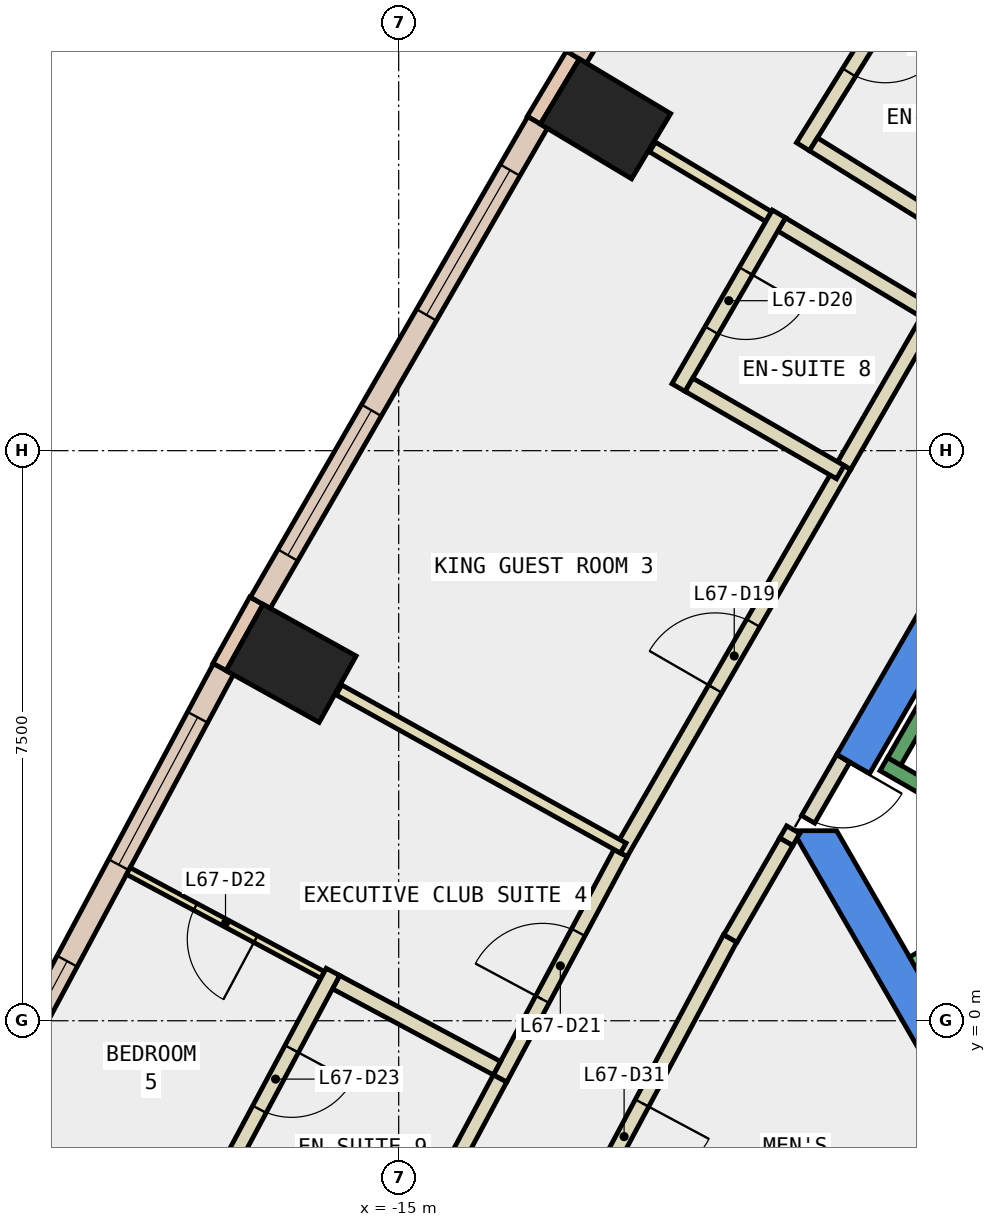
"""IFC4 building model, lengths in metres.
Left out: names, types, materials, properties, quantities, classifications, styles, units other than length and angle.
Written with IfcOpenShell. Run it as: python <this file> out.ifc"""

import sys

from ifc_helpers import new_model, si_unit, direction, frame, frame_2d, origin, origin_2d, place, context, subcontext, project, spatial, polyline, rectangle, outline, extrude, element, fill, save


model = new_model("IFC4")
c1 = context("Model", 3, precision=1e-05, world=origin(), true_north=direction((0.0, 1.0)))
c2 = subcontext(c1, "Body", "Model", "MODEL_VIEW")
j1 = project(units=[si_unit("LENGTHUNIT", "METRE"), si_unit("PLANEANGLEUNIT", "RADIAN")], contexts=[c1])
p1 = place(None, origin())
s1 = spatial("IfcSite", under=j1, at=p1, CompositionType="ELEMENT")
p2 = place(p1, origin())
s2 = spatial("IfcBuilding", under=s1, at=p2, CompositionType="ELEMENT")
p3 = place(p2, frame((0.0, 0.0, 290.0)))
s3 = spatial("IfcBuildingStorey", under=s2, at=p3, CompositionType="ELEMENT", Elevation=290.0)
for number, where, z_axis, x_axis in (
    (1, (-12.279, 11.865, -0.34), (0.0, 0.0, 1.0), (0.514, 0.858, 0.0)),
    (2, (-16.415, 4.702, -0.34), (0.0, 0.0, 1.0), (0.486, 0.874, 0.0)),
):
    element("IfcColumn", number, at=place(p3, frame(where, z_axis=z_axis, x_axis=x_axis)), inside=s3, PredefinedType="COLUMN", context=c2, shape_type="SweptSolid", body=[
        extrude(rectangle(XDim=1.0, YDim=1.4, at=origin_2d()), origin(), (0.0, 0.0, 1.0), 3.6),
    ])
p4 = place(p3, frame((0.0, 0.0, -0.34)))
e3 = element("IfcWall", 3, at=p4, inside=s3, PredefinedType="SHEAR", context=c2, shape_type="SweptSolid", body=[
    extrude(outline(polyline([(-9.236, 3.502), (-8.803, 3.253), (-4.619, 10.5), (-4.907, 11.0), (-9.236, 3.502)])), origin(), (0.0, 0.0, 1.0), 3.6),
])
p5 = place(p3, frame((0.0, 0.0, -0.34)))
e4 = element("IfcWall", 4, at=p5, inside=s3, PredefinedType="SHEAR", context=c2, shape_type="SweptSolid", body=[
    extrude(outline(polyline([(-9.815, 2.5), (-4.907, -6.0), (-4.619, -5.5), (-9.238, 2.5), (-9.815, 2.5)])), origin(), (0.0, 0.0, 1.0), 3.6),
])
p6 = place(p3, frame((-12.708, 12.706, 0.0), z_axis=(0.0, 0.0, 1.0), x_axis=(-0.513777707721, -0.857923345672, 0.0)))
e5 = element("IfcWall", 5, at=p6, inside=s3, PredefinedType="STANDARD", context=c2, shape_type="SweptSolid", body=[
    extrude(rectangle(XDim=1.0, YDim=0.2, at=frame_2d((0.5, 0.0))), origin(), (0.0, 0.0, 1.0), 3.26),
])
p7 = place(p3, frame((-16.872, 5.527, 0.0), z_axis=(0.0, 0.0, 1.0), x_axis=(-0.485850211157, -0.874042088414, 0.0)))
e6 = element("IfcWall", 6, at=p7, inside=s3, PredefinedType="STANDARD", context=c2, shape_type="SweptSolid", body=[
    extrude(rectangle(XDim=1.0, YDim=0.2, at=frame_2d((0.5, 0.0))), origin(), (0.0, 0.0, 1.0), 3.26),
])
p8 = place(p3, frame((-8.819, 18.855, 0.0), z_axis=(0.0, 0.0, 1.0), x_axis=(-0.527762071678, -0.849392250788, 0.0)))
e7 = element("IfcWall", 7, at=p8, inside=s3, PredefinedType="STANDARD", context=c2, shape_type="SweptSolid", body=[
    extrude(rectangle(XDim=7.276, YDim=0.3, at=frame_2d((3.638, 0.0))), origin(), (0.0, 0.0, 1.0), 3.26),
])
p9 = place(p8, frame((0.719, 0.0, 0.9)))
e8 = element("IfcOpeningElement", 8, at=p9, cuts=e7, PredefinedType="OPENING", context=c2, shape_type="SweptSolid", body=[
    extrude(rectangle(XDim=2.2, YDim=2.0, at=frame_2d((1.1, 1.0))), frame((0.0, 0.16, 0.0), z_axis=(0.0, -1.0, 0.0), x_axis=(1.0, 0.0, 0.0)), (0.0, 0.0, 1.0), 0.32),
])
p10 = place(p8, frame((4.357, 0.0, 0.9)))
e9 = element("IfcOpeningElement", 9, at=p10, cuts=e7, PredefinedType="OPENING", context=c2, shape_type="SweptSolid", body=[
    extrude(rectangle(XDim=2.2, YDim=2.0, at=frame_2d((1.1, 1.0))), frame((0.0, 0.16, 0.0), z_axis=(0.0, -1.0, 0.0), x_axis=(1.0, 0.0, 0.0)), (0.0, 0.0, 1.0), 0.32),
])
p11 = place(p3, frame((-13.172, 11.819, 0.0), z_axis=(0.0, 0.0, 1.0), x_axis=(-0.499945412946, -0.866056917341, 0.0)))
e10 = element("IfcWall", 10, at=p11, inside=s3, PredefinedType="STANDARD", context=c2, shape_type="SweptSolid", body=[
    extrude(rectangle(XDim=7.299, YDim=0.3, at=frame_2d((3.649, 0.0))), origin(), (0.0, 0.0, 1.0), 3.26),
])
p12 = place(p11, frame((0.725, 0.0, 0.9)))
e11 = element("IfcOpeningElement", 11, at=p12, cuts=e10, PredefinedType="OPENING", context=c2, shape_type="SweptSolid", body=[
    extrude(rectangle(XDim=2.2, YDim=2.0, at=frame_2d((1.1, 1.0))), frame((0.0, 0.16, 0.0), z_axis=(0.0, -1.0, 0.0), x_axis=(1.0, 0.0, 0.0)), (0.0, 0.0, 1.0), 0.32),
])
p13 = place(p11, frame((4.374, 0.0, 0.9)))
e12 = element("IfcOpeningElement", 12, at=p13, cuts=e10, PredefinedType="OPENING", context=c2, shape_type="SweptSolid", body=[
    extrude(rectangle(XDim=2.2, YDim=2.0, at=frame_2d((1.1, 1.0))), frame((0.0, 0.16, 0.0), z_axis=(0.0, -1.0, 0.0), x_axis=(1.0, 0.0, 0.0)), (0.0, 0.0, 1.0), 0.32),
])
p14 = place(p3, frame((-17.306, 4.626, 0.0), z_axis=(0.0, 0.0, 1.0), x_axis=(-0.471789353675, -0.881711293882, 0.0)))
e13 = element("IfcWall", 13, at=p14, inside=s3, PredefinedType="STANDARD", context=c2, shape_type="SweptSolid", body=[
    extrude(rectangle(XDim=7.277, YDim=0.3, at=frame_2d((3.638, 0.0))), origin(), (0.0, 0.0, 1.0), 3.26),
])
p15 = place(p14, frame((0.719, 0.0, 0.9)))
e14 = element("IfcOpeningElement", 14, at=p15, cuts=e13, PredefinedType="OPENING", context=c2, shape_type="SweptSolid", body=[
    extrude(rectangle(XDim=2.2, YDim=2.0, at=frame_2d((1.1, 1.0))), frame((0.0, 0.16, 0.0), z_axis=(0.0, -1.0, 0.0), x_axis=(1.0, 0.0, 0.0)), (0.0, 0.0, 1.0), 0.32),
])
p16 = place(p14, frame((4.358, 0.0, 0.9)))
e15 = element("IfcOpeningElement", 15, at=p16, cuts=e13, PredefinedType="OPENING", context=c2, shape_type="SweptSolid", body=[
    extrude(rectangle(XDim=2.2, YDim=2.0, at=frame_2d((1.1, 1.0))), frame((0.0, 0.16, 0.0), z_axis=(0.0, -1.0, 0.0), x_axis=(1.0, 0.0, 0.0)), (0.0, 0.0, 1.0), 0.32),
])
p17 = place(p3, frame((-9.809, 2.514, 0.0), z_axis=(0.0, 0.0, 1.0), x_axis=(-0.497849076449, -0.867263683708, 0.0)))
e16 = element("IfcWall", 16, at=p17, inside=s3, PredefinedType="PARTITIONING", context=c2, shape_type="SweptSolid", body=[
    extrude(rectangle(XDim=0.184, YDim=0.2, at=frame_2d((0.092, 0.0))), origin(), (0.0, 0.0, 1.0), 2.4),
])
p18 = place(p3, frame((-10.639, 1.084, 0.0), z_axis=(0.0, 0.0, 1.0), x_axis=(-0.471696599276, -0.881760918975, 0.0)))
e17 = element("IfcWall", 17, at=p18, inside=s3, PredefinedType="PARTITIONING", context=c2, shape_type="SweptSolid", body=[
    extrude(rectangle(XDim=6.172, YDim=0.2, at=frame_2d((3.086, 0.0))), origin(), (0.0, 0.0, 1.0), 3.26),
])
p19 = place(p18, frame((2.458, 0.0, 0.0)))
e18 = element("IfcOpeningElement", 18, at=p19, cuts=e17, PredefinedType="OPENING", context=c2, shape_type="SweptSolid", body=[
    extrude(rectangle(XDim=1.0, YDim=2.1, at=frame_2d((0.5, 1.05))), frame((0.0, 0.11, 0.0), z_axis=(0.0, -1.0, 0.0), x_axis=(1.0, 0.0, 0.0)), (0.0, 0.0, 1.0), 0.22),
])
p20 = place(p3, frame((-12.082, 2.207, 0.0), z_axis=(0.0, 0.0, 1.0), x_axis=(0.500123454404, 0.865954115618, 0.0)))
e19 = element("IfcWall", 19, at=p20, inside=s3, PredefinedType="PARTITIONING", context=c2, shape_type="SweptSolid", body=[
    extrude(rectangle(XDim=5.885, YDim=0.2, at=frame_2d((2.942, 0.0))), origin(), (0.0, 0.0, 1.0), 3.26),
])
p21 = place(p20, frame((2.493, 0.0, 0.0)))
e20 = element("IfcOpeningElement", 20, at=p21, cuts=e19, PredefinedType="OPENING", context=c2, shape_type="SweptSolid", body=[
    extrude(rectangle(XDim=1.0, YDim=2.1, at=frame_2d((0.5, 1.05))), frame((0.0, 0.11, 0.0), z_axis=(0.0, -1.0, 0.0), x_axis=(1.0, 0.0, 0.0)), (0.0, 0.0, 1.0), 0.22),
])
p22 = place(p3, frame((-9.139, 7.303, 0.0), z_axis=(0.0, 0.0, 1.0), x_axis=(0.499869187296, 0.866100915363, 0.0)))
e21 = element("IfcWall", 21, at=p22, inside=s3, PredefinedType="PARTITIONING", context=c2, shape_type="SweptSolid", body=[
    extrude(rectangle(XDim=2.401, YDim=0.2, at=frame_2d((1.2, 0.0))), origin(), (0.0, 0.0, 1.0), 3.26),
])
p23 = place(p3, frame((-13.666, -0.76, 0.0), z_axis=(0.0, 0.0, 1.0), x_axis=(0.471643060173, 0.881789557543, 0.0)))
e22 = element("IfcWall", 22, at=p23, inside=s3, PredefinedType="PARTITIONING", context=c2, shape_type="SweptSolid", body=[
    extrude(rectangle(XDim=3.363, YDim=0.2, at=frame_2d((1.681, 0.0))), origin(), (0.0, 0.0, 1.0), 3.26),
])
p24 = place(p23, frame((1.181, 0.0, 0.0)))
e23 = element("IfcOpeningElement", 23, at=p24, cuts=e22, PredefinedType="OPENING", context=c2, shape_type="SweptSolid", body=[
    extrude(rectangle(XDim=1.0, YDim=2.1, at=frame_2d((0.5, 1.05))), frame((0.0, 0.11, 0.0), z_axis=(0.0, -1.0, 0.0), x_axis=(1.0, 0.0, 0.0)), (0.0, 0.0, 1.0), 0.22),
])
p25 = place(p3, frame((-15.082, -3.405, 0.0), z_axis=(0.0, 0.0, 1.0), x_axis=(0.471719946084, 0.88174842924, 0.0)))
e24 = element("IfcWall", 24, at=p25, inside=s3, PredefinedType="PARTITIONING", context=c2, shape_type="SweptSolid", body=[
    extrude(rectangle(XDim=3.0, YDim=0.2, at=frame_2d((1.5, 0.0))), origin(), (0.0, 0.0, 1.0), 3.26),
])
p26 = place(p3, frame((-7.992, 14.217, 0.0), z_axis=(0.0, 0.0, 1.0), x_axis=(-0.527795797674, -0.849371294522, 0.0)))
e25 = element("IfcWall", 25, at=p26, inside=s3, PredefinedType="PARTITIONING", context=c2, shape_type="SweptSolid", body=[
    extrude(rectangle(XDim=3.2, YDim=0.2, at=frame_2d((1.6, 0.0))), origin(), (0.0, 0.0, 1.0), 3.26),
])
p27 = place(p26, frame((1.15, 0.0, 0.0)))
e26 = element("IfcOpeningElement", 26, at=p27, cuts=e25, PredefinedType="OPENING", context=c2, shape_type="SweptSolid", body=[
    extrude(rectangle(XDim=0.9, YDim=2.1, at=frame_2d((0.45, 1.05))), frame((0.0, 0.11, 0.0), z_axis=(0.0, -1.0, 0.0), x_axis=(1.0, 0.0, 0.0)), (0.0, 0.0, 1.0), 0.22),
])
p28 = place(p3, frame((-9.543, 11.531, 0.0), z_axis=(0.0, 0.0, 1.0), x_axis=(0.849400119549, -0.527749407305, 0.0)))
e27 = element("IfcWall", 27, at=p28, inside=s3, PredefinedType="PARTITIONING", context=c2, shape_type="SweptSolid", body=[
    extrude(rectangle(XDim=2.5, YDim=0.2, at=frame_2d((1.25, 0.0))), origin(), (0.0, 0.0, 1.0), 3.26),
])
p29 = place(p3, frame((-10.133, 10.58, 0.0), z_axis=(0.0, 0.0, 1.0), x_axis=(-0.857903919212, 0.513810145287, 0.0)))
e28 = element("IfcWall", 28, at=p29, inside=s3, PredefinedType="PARTITIONING", context=c2, shape_type="SweptSolid", body=[
    extrude(rectangle(XDim=1.781, YDim=0.15, at=frame_2d((0.891, 0.0))), origin(), (0.0, 0.0, 1.0), 3.26),
])
p30 = place(p3, frame((-7.989, 9.295, 0.0), z_axis=(0.0, 0.0, 1.0), x_axis=(-0.857801856135, 0.513980520654, 0.0)))
e29 = element("IfcWall", 29, at=p30, inside=s3, PredefinedType="PARTITIONING", context=c2, shape_type="SweptSolid", body=[
    extrude(rectangle(XDim=2.3, YDim=0.2, at=frame_2d((1.15, 0.0))), origin(), (0.0, 0.0, 1.0), 3.26),
])
p31 = place(p3, frame((-9.997, 10.615, 0.0), z_axis=(0.0, 0.0, 1.0), x_axis=(-0.500525697837, -0.865721679182, 0.0)))
e30 = element("IfcWall", 30, at=p31, inside=s3, PredefinedType="PARTITIONING", context=c2, shape_type="SweptSolid", body=[
    extrude(rectangle(XDim=2.639, YDim=0.2, at=frame_2d((1.32, 0.0))), origin(), (0.0, 0.0, 1.0), 3.26),
])
p32 = place(p31, frame((0.869, 0.0, 0.0)))
e31 = element("IfcOpeningElement", 31, at=p32, cuts=e30, PredefinedType="OPENING", context=c2, shape_type="SweptSolid", body=[
    extrude(rectangle(XDim=0.9, YDim=2.1, at=frame_2d((0.45, 1.05))), frame((0.0, 0.11, 0.0), z_axis=(0.0, -1.0, 0.0), x_axis=(1.0, 0.0, 0.0)), (0.0, 0.0, 1.0), 0.22),
])
p33 = place(p3, frame((-11.181, 8.367, 0.0), z_axis=(0.0, 0.0, 1.0), x_axis=(0.866053019151, -0.499952165731, 0.0)))
e32 = element("IfcWall", 32, at=p33, inside=s3, PredefinedType="PARTITIONING", context=c2, shape_type="SweptSolid", body=[
    extrude(rectangle(XDim=2.3, YDim=0.2, at=frame_2d((1.15, 0.0))), origin(), (0.0, 0.0, 1.0), 3.26),
])
p34 = place(p3, frame((-12.045, 2.272, 0.0), z_axis=(0.0, 0.0, 1.0), x_axis=(-0.873982340973, 0.485957680943, 0.0)))
e33 = element("IfcWall", 33, at=p34, inside=s3, PredefinedType="PARTITIONING", context=c2, shape_type="SweptSolid", body=[
    extrude(rectangle(XDim=4.28, YDim=0.15, at=frame_2d((2.14, 0.0))), origin(), (0.0, 0.0, 1.0), 3.26),
])
p35 = place(p3, frame((-16.0, 0.602, 0.0), z_axis=(0.0, 0.0, 1.0), x_axis=(-0.881743923375, 0.47172836844, 0.0)))
e34 = element("IfcWall", 34, at=p35, inside=s3, PredefinedType="PARTITIONING", context=c2, shape_type="SweptSolid", body=[
    extrude(rectangle(XDim=2.9, YDim=0.1, at=frame_2d((1.45, 0.0))), origin(), (0.0, 0.0, 1.0), 3.26),
])
p36 = place(p35, frame((1.0, 0.0, 0.0)))
e35 = element("IfcOpeningElement", 35, at=p36, cuts=e34, PredefinedType="OPENING", context=c2, shape_type="SweptSolid", body=[
    extrude(rectangle(XDim=0.9, YDim=2.1, at=frame_2d((0.45, 1.05))), frame((0.0, 0.06, 0.0), z_axis=(0.0, -1.0, 0.0), x_axis=(1.0, 0.0, 0.0)), (0.0, 0.0, 1.0), 0.12),
])
p37 = place(p3, frame((-13.707, -0.624, 0.0), z_axis=(0.0, 0.0, 1.0), x_axis=(-0.881825950813, 0.471575012562, 0.0)))
e36 = element("IfcWall", 36, at=p37, inside=s3, PredefinedType="PARTITIONING", context=c2, shape_type="SweptSolid", body=[
    extrude(rectangle(XDim=2.401, YDim=0.2, at=frame_2d((1.2, 0.0))), origin(), (0.0, 0.0, 1.0), 3.26),
])
p38 = place(p3, frame((-15.865, 0.643, 0.0), z_axis=(0.0, 0.0, 1.0), x_axis=(-0.471677088066, -0.881771356188, 0.0)))
e37 = element("IfcWall", 37, at=p38, inside=s3, PredefinedType="PARTITIONING", context=c2, shape_type="SweptSolid", body=[
    extrude(rectangle(XDim=3.199, YDim=0.2, at=frame_2d((1.6, 0.0))), origin(), (0.0, 0.0, 1.0), 3.26),
])
p39 = place(p38, frame((1.15, 0.0, 0.0)))
e38 = element("IfcOpeningElement", 38, at=p39, cuts=e37, PredefinedType="OPENING", context=c2, shape_type="SweptSolid", body=[
    extrude(rectangle(XDim=0.9, YDim=2.1, at=frame_2d((0.45, 1.05))), frame((0.0, 0.11, 0.0), z_axis=(0.0, -1.0, 0.0), x_axis=(1.0, 0.0, 0.0)), (0.0, 0.0, 1.0), 0.22),
])
p40 = place(p3, frame((-9.15, 3.452, 0.0), z_axis=(0.0, 0.0, 1.0), x_axis=(-0.500079945886, -0.865979242085, 0.0)))
e39 = element("IfcWall", 39, at=p40, inside=s3, PredefinedType="PARTITIONING", context=c2, shape_type="SweptSolid", body=[
    extrude(rectangle(XDim=0.926, YDim=0.2, at=frame_2d((0.463, 0.0))), origin(), (0.0, 0.0, 1.0), 2.4),
])
p41 = place(p40, frame((0.017, 0.0, 0.0)))
e40 = element("IfcOpeningElement", 40, at=p41, cuts=e39, PredefinedType="OPENING", context=c2, shape_type="SweptSolid", body=[
    extrude(rectangle(XDim=0.9, YDim=2.1, at=frame_2d((0.45, 1.05))), frame((0.0, 0.11, 0.0), z_axis=(0.0, -1.0, 0.0), x_axis=(1.0, 0.0, 0.0)), (0.0, 0.0, 1.0), 0.22),
])
p42 = place(p3, frame((-9.901, 2.354, 0.0), z_axis=(0.0, 0.0, 1.0), x_axis=(-0.500374498448, -0.865809079014, 0.0)))
e41 = element("IfcWall", 41, at=p42, inside=s3, PredefinedType="PARTITIONING", context=c2, shape_type="SweptSolid", body=[
    extrude(rectangle(XDim=1.469, YDim=0.2, at=frame_2d((0.734, 0.0))), origin(), (0.0, 0.0, 1.0), 3.26),
])
p43 = place(p3, frame((-8.192, 0.888, 0.0), z_axis=(0.0, 0.0, 1.0), x_axis=(0.500034260056, -0.866005622828, 0.0)))
e42 = element("IfcWall", 42, at=p43, inside=s3, PredefinedType="STANDARD", context=c2, shape_type="SweptSolid", body=[
    extrude(rectangle(XDim=5.399, YDim=0.2, at=frame_2d((2.7, 0.0))), origin(), (0.0, 0.0, 1.0), 3.26),
])
p44 = place(p3, frame((-6.25, 2.01, 0.0), z_axis=(0.0, 0.0, 1.0), x_axis=(-0.86611865017, 0.499838457731, 0.0)))
e43 = element("IfcWall", 43, at=p44, inside=s3, PredefinedType="STANDARD", context=c2, shape_type="SweptSolid", body=[
    extrude(rectangle(XDim=2.733, YDim=0.2, at=frame_2d((1.366, 0.0))), origin(), (0.0, 0.0, 1.0), 3.26),
])
p45 = place(p3, frame((-5.03, 9.388, 0.0), z_axis=(0.0, 0.0, 1.0), x_axis=(-0.499978703459, -0.866037698999, 0.0)))
e44 = element("IfcWall", 44, at=p45, inside=s3, PredefinedType="STANDARD", context=c2, shape_type="SweptSolid", body=[
    extrude(rectangle(XDim=6.9, YDim=0.2, at=frame_2d((3.45, 0.0))), origin(), (0.0, 0.0, 1.0), 3.26),
])
p46 = place(p12, origin())
e45 = element("IfcWindow", 45, at=p46, inside=s3, PartitioningType="SINGLE_PANEL", PredefinedType="WINDOW", context=c2, shape_type="SweptSolid", body=[
    extrude(rectangle(XDim=2.2, YDim=2.0, at=frame_2d((1.1, 1.0))), frame((0.0, 0.03, 0.0), z_axis=(0.0, -1.0, 0.0), x_axis=(1.0, 0.0, 0.0)), (0.0, 0.0, 1.0), 0.06),
])
fill(e11, e45)
p47 = place(p13, origin())
e46 = element("IfcWindow", 46, at=p47, inside=s3, PartitioningType="SINGLE_PANEL", PredefinedType="WINDOW", context=c2, shape_type="SweptSolid", body=[
    extrude(rectangle(XDim=2.2, YDim=2.0, at=frame_2d((1.1, 1.0))), frame((0.0, 0.03, 0.0), z_axis=(0.0, -1.0, 0.0), x_axis=(1.0, 0.0, 0.0)), (0.0, 0.0, 1.0), 0.06),
])
fill(e12, e46)
p48 = place(p15, origin())
e47 = element("IfcWindow", 47, at=p48, inside=s3, PartitioningType="SINGLE_PANEL", PredefinedType="WINDOW", context=c2, shape_type="SweptSolid", body=[
    extrude(rectangle(XDim=2.2, YDim=2.0, at=frame_2d((1.1, 1.0))), frame((0.0, 0.03, 0.0), z_axis=(0.0, -1.0, 0.0), x_axis=(1.0, 0.0, 0.0)), (0.0, 0.0, 1.0), 0.06),
])
fill(e14, e47)
p49 = place(p16, origin())
e48 = element("IfcWindow", 48, at=p49, inside=s3, PartitioningType="SINGLE_PANEL", PredefinedType="WINDOW", context=c2, shape_type="SweptSolid", body=[
    extrude(rectangle(XDim=2.2, YDim=2.0, at=frame_2d((1.1, 1.0))), frame((0.0, 0.03, 0.0), z_axis=(0.0, -1.0, 0.0), x_axis=(1.0, 0.0, 0.0)), (0.0, 0.0, 1.0), 0.06),
])
fill(e15, e48)
p50 = place(p27, origin())
e49 = element("IfcDoor", 49, at=p50, inside=s3, OperationType="SINGLE_SWING_LEFT", PredefinedType="DOOR", context=c2, shape_type="SweptSolid", body=[
    extrude(rectangle(XDim=0.9, YDim=2.1, at=frame_2d((0.45, 1.05))), frame((0.0, 0.025, 0.0), z_axis=(0.0, -1.0, 0.0), x_axis=(1.0, 0.0, 0.0)), (0.0, 0.0, 1.0), 0.05),
])
fill(e26, e49)
p51 = place(p21, origin())
e50 = element("IfcDoor", 50, at=p51, inside=s3, OperationType="SINGLE_SWING_LEFT", PredefinedType="DOOR", context=c2, shape_type="SweptSolid", body=[
    extrude(rectangle(XDim=1.0, YDim=2.1, at=frame_2d((0.5, 1.05))), frame((0.0, 0.025, 0.0), z_axis=(0.0, -1.0, 0.0), x_axis=(1.0, 0.0, 0.0)), (0.0, 0.0, 1.0), 0.05),
])
fill(e20, e50)
p52 = place(p32, origin())
e51 = element("IfcDoor", 51, at=p52, inside=s3, OperationType="SINGLE_SWING_LEFT", PredefinedType="DOOR", context=c2, shape_type="SweptSolid", body=[
    extrude(rectangle(XDim=0.9, YDim=2.1, at=frame_2d((0.45, 1.05))), frame((0.0, 0.025, 0.0), z_axis=(0.0, -1.0, 0.0), x_axis=(1.0, 0.0, 0.0)), (0.0, 0.0, 1.0), 0.05),
])
fill(e31, e51)
p53 = place(p24, origin())
e52 = element("IfcDoor", 52, at=p53, inside=s3, OperationType="SINGLE_SWING_LEFT", PredefinedType="DOOR", context=c2, shape_type="SweptSolid", body=[
    extrude(rectangle(XDim=1.0, YDim=2.1, at=frame_2d((0.5, 1.05))), frame((0.0, 0.025, 0.0), z_axis=(0.0, -1.0, 0.0), x_axis=(1.0, 0.0, 0.0)), (0.0, 0.0, 1.0), 0.05),
])
fill(e23, e52)
p54 = place(p36, origin())
e53 = element("IfcDoor", 53, at=p54, inside=s3, OperationType="SINGLE_SWING_LEFT", PredefinedType="DOOR", context=c2, shape_type="SweptSolid", body=[
    extrude(rectangle(XDim=0.9, YDim=2.1, at=frame_2d((0.45, 1.05))), frame((0.0, 0.025, 0.0), z_axis=(0.0, -1.0, 0.0), x_axis=(1.0, 0.0, 0.0)), (0.0, 0.0, 1.0), 0.05),
])
fill(e35, e53)
p55 = place(p39, origin())
e54 = element("IfcDoor", 54, at=p55, inside=s3, OperationType="SINGLE_SWING_LEFT", PredefinedType="DOOR", context=c2, shape_type="SweptSolid", body=[
    extrude(rectangle(XDim=0.9, YDim=2.1, at=frame_2d((0.45, 1.05))), frame((0.0, 0.025, 0.0), z_axis=(0.0, -1.0, 0.0), x_axis=(1.0, 0.0, 0.0)), (0.0, 0.0, 1.0), 0.05),
])
fill(e38, e54)
p56 = place(p19, origin())
e55 = element("IfcDoor", 55, at=p56, inside=s3, OperationType="SINGLE_SWING_LEFT", PredefinedType="DOOR", context=c2, shape_type="SweptSolid", body=[
    extrude(rectangle(XDim=1.0, YDim=2.1, at=frame_2d((0.5, 1.05))), frame((0.0, 0.025, 0.0), z_axis=(0.0, -1.0, 0.0), x_axis=(1.0, 0.0, 0.0)), (0.0, 0.0, 1.0), 0.05),
])
fill(e18, e55)
p57 = place(p41, origin())
e56 = element("IfcDoor", 56, at=p57, inside=s3, OperationType="SINGLE_SWING_LEFT", PredefinedType="DOOR", context=c2, shape_type="SweptSolid", body=[
    extrude(rectangle(XDim=0.9, YDim=2.1, at=frame_2d((0.45, 1.05))), frame((0.0, 0.025, 0.0), z_axis=(0.0, -1.0, 0.0), x_axis=(1.0, 0.0, 0.0)), (0.0, 0.0, 1.0), 0.05),
])
fill(e40, e56)
save(model, sys.argv[1])
